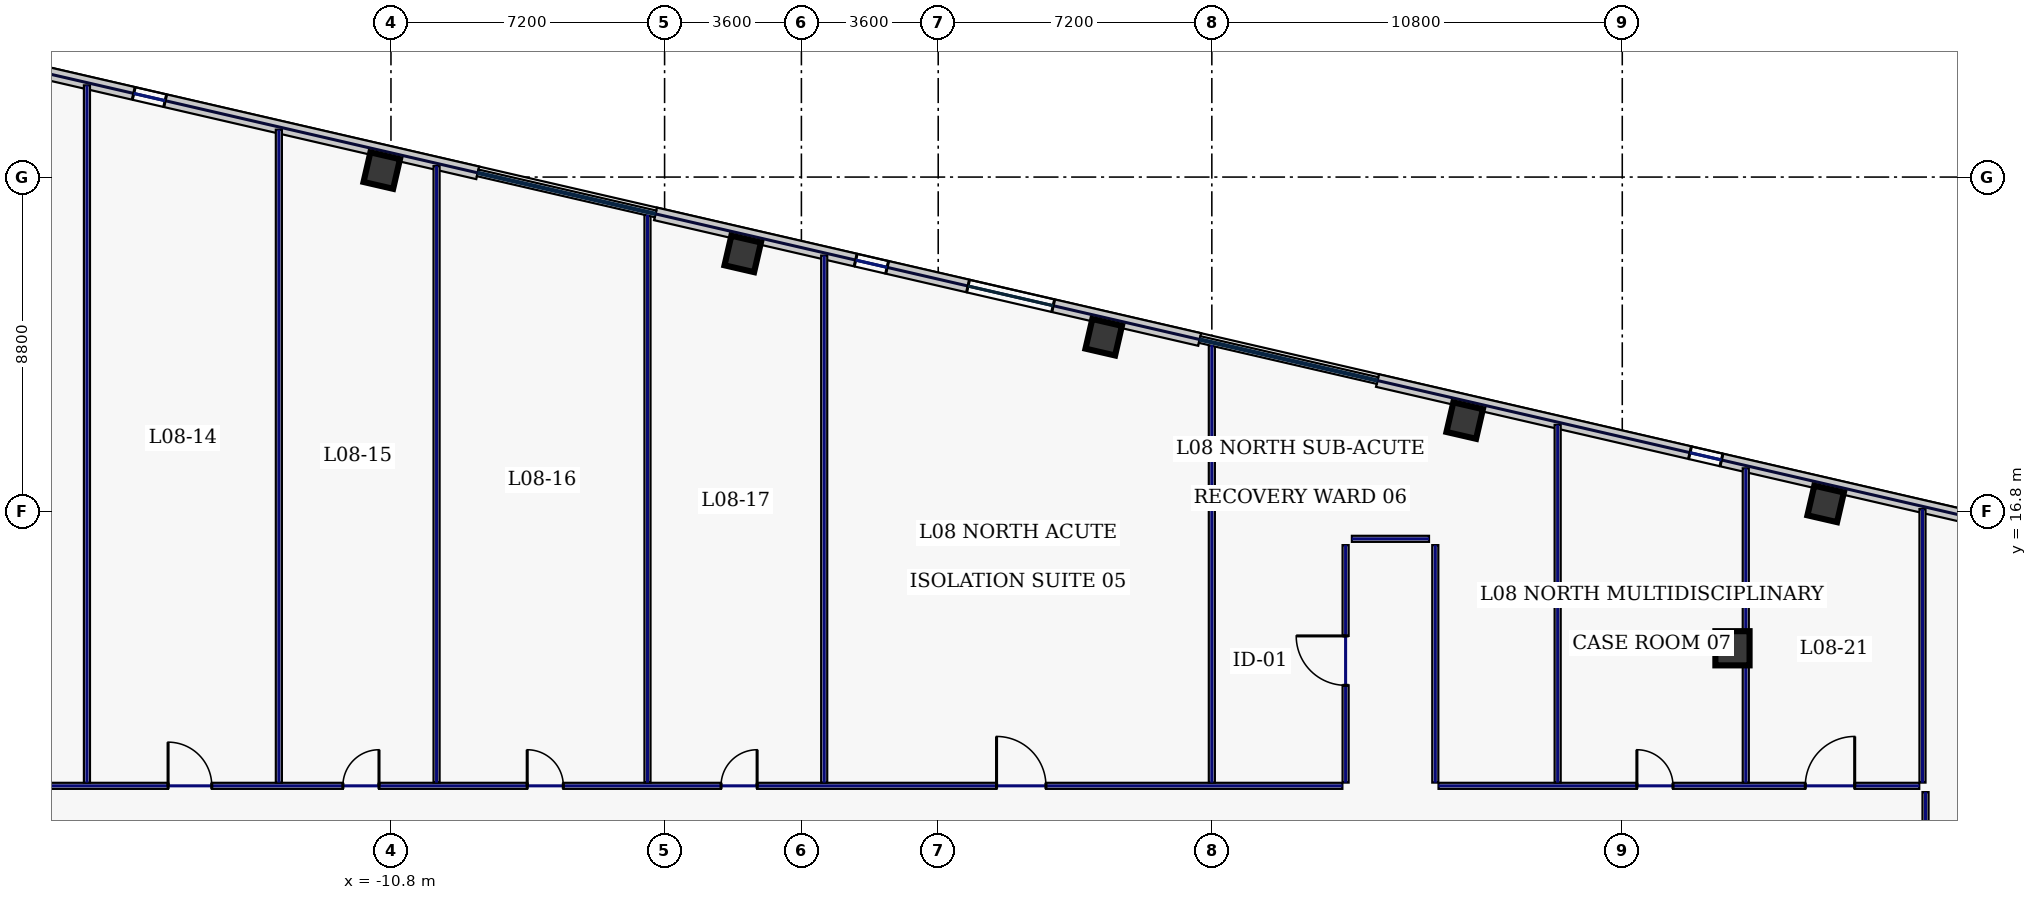
"""IFC4 building model, lengths in metres.
Left out: names, types, materials, properties, quantities, classifications, styles, units other than length and angle.
Written with IfcOpenShell. Run it as: python <this file> out.ifc"""

import sys

from ifc_helpers import new_model, si_unit, direction, frame, frame_2d, origin, origin_2d, place, context, subcontext, project, spatial, rectangle, hollow_rectangle, extrude, element, fill, save


model = new_model("IFC4")
c1 = context("Model", 3, precision=1e-05, world=origin(), true_north=direction((0.0, 1.0)))
c2 = subcontext(c1, "Body", "Model", "MODEL_VIEW")
j1 = project(units=[si_unit("LENGTHUNIT", "METRE"), si_unit("PLANEANGLEUNIT", "RADIAN")], contexts=[c1])
p1 = place(None, origin())
s1 = spatial("IfcSite", under=j1, at=p1, CompositionType="ELEMENT")
p2 = place(p1, origin())
s2 = spatial("IfcBuilding", under=s1, at=p2, CompositionType="ELEMENT")
p3 = place(p2, frame((0.0, 0.0, 43.4)))
s3 = spatial("IfcBuildingStorey", under=s2, at=p3, CompositionType="ELEMENT", Elevation=43.4)
p4 = place(p3, frame((24.5, 13.2, 0.0), z_axis=(0.0, 0.0, 1.0), x_axis=(1.0, 0.0, 0.0)))
e1 = element("IfcColumn", 1, at=p4, inside=s3, PredefinedType="COLUMN", context=c2, shape_type="SweptSolid", body=[
    extrude(hollow_rectangle(XDim=0.9, YDim=0.9, WallThickness=0.04, at=origin_2d()), origin(), (0.0, 0.0, 1.0), 3.74),
])
for number, where, z_axis, x_axis in (
    (2, (26.952, 16.999, 0.0), (0.0, 0.0, 1.0), (0.974, -0.225, 0.0)),
    (3, (17.454, 19.192, 0.0), (0.0, 0.0, 1.0), (0.974, -0.225, 0.0)),
    (4, (7.955, 21.385, 0.0), (0.0, 0.0, 1.0), (0.974, -0.225, 0.0)),
    (5, (-1.544, 23.578, 0.0), (0.0, 0.0, 1.0), (0.974, -0.225, 0.0)),
    (6, (-11.042, 25.771, 0.0), (0.0, 0.0, 1.0), (0.974, -0.225, 0.0)),
):
    element("IfcColumn", number, at=place(p3, frame(where, z_axis=z_axis, x_axis=x_axis)), inside=s3, PredefinedType="COLUMN", context=c2, shape_type="SweptSolid", body=[
        extrude(hollow_rectangle(XDim=0.8, YDim=0.8, WallThickness=0.036, at=origin_2d()), origin(), (0.0, 0.0, 1.0), 3.74),
    ])
p5 = place(p3, frame((37.229, 15.15, 0.0), z_axis=(0.0, 0.0, 1.0), x_axis=(-0.97436993772, 0.224951604723, 0.0)))
e7 = element("IfcWall", 7, at=p5, inside=s3, PredefinedType="STANDARD", context=c2, shape_type="SweptSolid", body=[
    extrude(rectangle(XDim=22.651, YDim=0.34, at=frame_2d((11.326, 0.0))), origin(), (0.0, 0.0, 1.0), 3.74),
])
p6 = place(p5, frame((13.361, 0.0, 0.77)))
e8 = element("IfcOpeningElement", 8, at=p6, cuts=e7, PredefinedType="OPENING", context=c2, shape_type="SweptSolid", body=[
    extrude(rectangle(XDim=0.85, YDim=1.85, at=frame_2d((0.425, 0.925))), frame((0.0, 0.18, 0.0), z_axis=(0.0, -1.0, 0.0), x_axis=(1.0, 0.0, 0.0)), (0.0, 0.0, 1.0), 0.36),
])
p7 = place(p5, frame((2.162, 0.0, 0.77)))
e9 = element("IfcOpeningElement", 9, at=p7, cuts=e7, PredefinedType="OPENING", context=c2, shape_type="SweptSolid", body=[
    extrude(rectangle(XDim=2.3, YDim=2.1, at=frame_2d((1.15, 1.05))), frame((0.0, 0.18, 0.0), z_axis=(0.0, -1.0, 0.0), x_axis=(1.0, 0.0, 0.0)), (0.0, 0.0, 1.0), 0.36),
])
p8 = place(p3, frame((10.481, 21.325, 0.0), z_axis=(0.0, 0.0, 1.0), x_axis=(-0.974369353393, 0.2249541357, 0.0)))
e10 = element("IfcWall", 10, at=p8, inside=s3, PredefinedType="STANDARD", context=c2, shape_type="SweptSolid", body=[
    extrude(rectangle(XDim=14.697, YDim=0.34, at=frame_2d((7.349, 0.0))), origin(), (0.0, 0.0, 1.0), 3.74),
])
p9 = place(p8, frame((8.441, 0.0, 0.77)))
e11 = element("IfcOpeningElement", 11, at=p9, cuts=e10, PredefinedType="OPENING", context=c2, shape_type="SweptSolid", body=[
    extrude(rectangle(XDim=0.85, YDim=1.85, at=frame_2d((0.425, 0.925))), frame((0.0, 0.18, 0.0), z_axis=(0.0, -1.0, 0.0), x_axis=(1.0, 0.0, 0.0)), (0.0, 0.0, 1.0), 0.36),
])
p10 = place(p8, frame((3.956, 0.0, 0.77)))
e12 = element("IfcOpeningElement", 12, at=p10, cuts=e10, PredefinedType="OPENING", context=c2, shape_type="SweptSolid", body=[
    extrude(rectangle(XDim=2.3, YDim=2.1, at=frame_2d((1.15, 1.05))), frame((0.0, 0.18, 0.0), z_axis=(0.0, -1.0, 0.0), x_axis=(1.0, 0.0, 0.0)), (0.0, 0.0, 1.0), 0.36),
])
p11 = place(p3, frame((-8.517, 25.711, 0.0), z_axis=(0.0, 0.0, 1.0), x_axis=(-0.974372845456, 0.224939009598, 0.0)))
e13 = element("IfcWall", 13, at=p11, inside=s3, PredefinedType="STANDARD", context=c2, shape_type="SweptSolid", body=[
    extrude(rectangle(XDim=22.652, YDim=0.34, at=frame_2d((11.326, 0.0))), origin(), (0.0, 0.0, 1.0), 3.74),
])
p12 = place(p11, frame((18.189, 0.0, 0.77)))
e14 = element("IfcOpeningElement", 14, at=p12, cuts=e13, PredefinedType="OPENING", context=c2, shape_type="SweptSolid", body=[
    extrude(rectangle(XDim=2.3, YDim=2.1, at=frame_2d((1.15, 1.05))), frame((0.0, 0.18, 0.0), z_axis=(0.0, -1.0, 0.0), x_axis=(1.0, 0.0, 0.0)), (0.0, 0.0, 1.0), 0.36),
])
p13 = place(p11, frame((13.705, 0.0, 0.77)))
e15 = element("IfcOpeningElement", 15, at=p13, cuts=e13, PredefinedType="OPENING", context=c2, shape_type="SweptSolid", body=[
    extrude(rectangle(XDim=2.3, YDim=2.1, at=frame_2d((1.15, 1.05))), frame((0.0, 0.18, 0.0), z_axis=(0.0, -1.0, 0.0), x_axis=(1.0, 0.0, 0.0)), (0.0, 0.0, 1.0), 0.36),
])
p14 = place(p11, frame((8.441, 0.0, 0.77)))
e16 = element("IfcOpeningElement", 16, at=p14, cuts=e13, PredefinedType="OPENING", context=c2, shape_type="SweptSolid", body=[
    extrude(rectangle(XDim=0.85, YDim=1.85, at=frame_2d((0.425, 0.925))), frame((0.0, 0.18, 0.0), z_axis=(0.0, -1.0, 0.0), x_axis=(1.0, 0.0, 0.0)), (0.0, 0.0, 1.0), 0.36),
])
p15 = place(p3, frame((-29.415, 9.58, 0.0), z_axis=(0.0, 0.0, 1.0), x_axis=(1.0, 0.0, 0.0)))
e17 = element("IfcWall", 17, at=p15, inside=s3, PredefinedType="PARTITIONING", context=c2, shape_type="SweptSolid", body=[
    extrude(rectangle(XDim=43.65, YDim=0.16, at=frame_2d((21.825, 0.0))), origin(), (0.0, 0.0, 1.0), 3.74),
])
p16 = place(p15, frame((2.044, 0.0, 0.0)))
e18 = element("IfcOpeningElement", 18, at=p16, cuts=e17, PredefinedType="OPENING", context=c2, shape_type="SweptSolid", body=[
    extrude(rectangle(XDim=0.95, YDim=2.2, at=frame_2d((0.475, 1.1))), frame((0.0, 0.09, 0.0), z_axis=(0.0, -1.0, 0.0), x_axis=(1.0, 0.0, 0.0)), (0.0, 0.0, 1.0), 0.18),
])
p17 = place(p15, frame((7.025, 0.0, 0.0)))
e19 = element("IfcOpeningElement", 19, at=p17, cuts=e17, PredefinedType="OPENING", context=c2, shape_type="SweptSolid", body=[
    extrude(rectangle(XDim=1.3, YDim=2.2, at=frame_2d((0.65, 1.1))), frame((0.0, 0.09, 0.0), z_axis=(0.0, -1.0, 0.0), x_axis=(1.0, 0.0, 0.0)), (0.0, 0.0, 1.0), 0.18),
])
p18 = place(p15, frame((12.75, 0.0, 0.0)))
e20 = element("IfcOpeningElement", 20, at=p18, cuts=e17, PredefinedType="OPENING", context=c2, shape_type="SweptSolid", body=[
    extrude(rectangle(XDim=1.15, YDim=2.2, at=frame_2d((0.575, 1.1))), frame((0.0, 0.09, 0.0), z_axis=(0.0, -1.0, 0.0), x_axis=(1.0, 0.0, 0.0)), (0.0, 0.0, 1.0), 0.18),
])
p19 = place(p15, frame((17.35, 0.0, 0.0)))
e21 = element("IfcOpeningElement", 21, at=p19, cuts=e17, PredefinedType="OPENING", context=c2, shape_type="SweptSolid", body=[
    extrude(rectangle(XDim=0.95, YDim=2.2, at=frame_2d((0.475, 1.1))), frame((0.0, 0.09, 0.0), z_axis=(0.0, -1.0, 0.0), x_axis=(1.0, 0.0, 0.0)), (0.0, 0.0, 1.0), 0.18),
])
p20 = place(p15, frame((22.2, 0.0, 0.0)))
e22 = element("IfcOpeningElement", 22, at=p20, cuts=e17, PredefinedType="OPENING", context=c2, shape_type="SweptSolid", body=[
    extrude(rectangle(XDim=0.95, YDim=2.2, at=frame_2d((0.475, 1.1))), frame((0.0, 0.09, 0.0), z_axis=(0.0, -1.0, 0.0), x_axis=(1.0, 0.0, 0.0)), (0.0, 0.0, 1.0), 0.18),
])
p21 = place(p15, frame((27.3, 0.0, 0.0)))
e23 = element("IfcOpeningElement", 23, at=p21, cuts=e17, PredefinedType="OPENING", context=c2, shape_type="SweptSolid", body=[
    extrude(rectangle(XDim=0.95, YDim=2.2, at=frame_2d((0.475, 1.1))), frame((0.0, 0.09, 0.0), z_axis=(0.0, -1.0, 0.0), x_axis=(1.0, 0.0, 0.0)), (0.0, 0.0, 1.0), 0.18),
])
p22 = place(p15, frame((34.55, 0.0, 0.0)))
e24 = element("IfcOpeningElement", 24, at=p22, cuts=e17, PredefinedType="OPENING", context=c2, shape_type="SweptSolid", body=[
    extrude(rectangle(XDim=1.3, YDim=2.2, at=frame_2d((0.65, 1.1))), frame((0.0, 0.09, 0.0), z_axis=(0.0, -1.0, 0.0), x_axis=(1.0, 0.0, 0.0)), (0.0, 0.0, 1.0), 0.18),
])
p23 = place(p3, frame((14.32, 9.665, 0.0), z_axis=(0.0, 0.0, 1.0), x_axis=(0.0, 1.0, 0.0)))
e25 = element("IfcWall", 25, at=p23, inside=s3, PredefinedType="PARTITIONING", context=c2, shape_type="SweptSolid", body=[
    extrude(rectangle(XDim=6.25, YDim=0.16, at=frame_2d((3.125, 0.0))), origin(), (0.0, 0.0, 1.0), 3.74),
])
p24 = place(p23, frame((2.56, 0.0, 0.0)))
e26 = element("IfcOpeningElement", 26, at=p24, cuts=e25, PredefinedType="OPENING", context=c2, shape_type="SweptSolid", body=[
    extrude(rectangle(XDim=1.3, YDim=2.2, at=frame_2d((0.65, 1.1))), frame((0.0, 0.09, 0.0), z_axis=(0.0, -1.0, 0.0), x_axis=(1.0, 0.0, 0.0)), (0.0, 0.0, 1.0), 0.18),
])
p25 = place(p3, frame((14.485, 16.08, 0.0), z_axis=(0.0, 0.0, 1.0), x_axis=(1.0, 0.0, 0.0)))
e27 = element("IfcWall", 27, at=p25, inside=s3, PredefinedType="PARTITIONING", context=c2, shape_type="SweptSolid", body=[
    extrude(rectangle(XDim=2.03, YDim=0.16, at=frame_2d((1.015, 0.0))), origin(), (0.0, 0.0, 1.0), 3.74),
])
p26 = place(p3, frame((16.68, 15.915, 0.0), z_axis=(0.0, 0.0, 1.0), x_axis=(0.0, -1.0, 0.0)))
e28 = element("IfcWall", 28, at=p26, inside=s3, PredefinedType="PARTITIONING", context=c2, shape_type="SweptSolid", body=[
    extrude(rectangle(XDim=6.25, YDim=0.16, at=frame_2d((3.125, 0.0))), origin(), (0.0, 0.0, 1.0), 3.74),
])
p27 = place(p3, frame((16.765, 9.58, 0.0), z_axis=(0.0, 0.0, 1.0), x_axis=(1.0, 0.0, 0.0)))
e29 = element("IfcWall", 29, at=p27, inside=s3, PredefinedType="PARTITIONING", context=c2, shape_type="SweptSolid", body=[
    extrude(rectangle(XDim=12.65, YDim=0.16, at=frame_2d((6.325, 0.0))), origin(), (0.0, 0.0, 1.0), 3.74),
])
p28 = place(p27, frame((5.22, 0.0, 0.0)))
e30 = element("IfcOpeningElement", 30, at=p28, cuts=e29, PredefinedType="OPENING", context=c2, shape_type="SweptSolid", body=[
    extrude(rectangle(XDim=0.95, YDim=2.2, at=frame_2d((0.475, 1.1))), frame((0.0, 0.09, 0.0), z_axis=(0.0, -1.0, 0.0), x_axis=(1.0, 0.0, 0.0)), (0.0, 0.0, 1.0), 0.18),
])
p29 = place(p27, frame((9.651, 0.0, 0.0)))
e31 = element("IfcOpeningElement", 31, at=p29, cuts=e29, PredefinedType="OPENING", context=c2, shape_type="SweptSolid", body=[
    extrude(rectangle(XDim=1.3, YDim=2.2, at=frame_2d((0.65, 1.1))), frame((0.0, 0.09, 0.0), z_axis=(0.0, -1.0, 0.0), x_axis=(1.0, 0.0, 0.0)), (0.0, 0.0, 1.0), 0.18),
])
p30 = place(p3, frame((29.58, 9.415, 0.0), z_axis=(0.0, 0.0, 1.0), x_axis=(0.0, -1.0, 0.0)))
e32 = element("IfcWall", 32, at=p30, inside=s3, PredefinedType="PARTITIONING", context=c2, shape_type="SweptSolid", body=[
    extrude(rectangle(XDim=18.63, YDim=0.16, at=frame_2d((9.315, 0.0))), origin(), (0.0, 0.0, 1.0), 3.74),
])
p31 = place(p30, frame((16.081, 0.0, 0.0)))
e33 = element("IfcOpeningElement", 33, at=p31, cuts=e32, PredefinedType="OPENING", context=c2, shape_type="SweptSolid", body=[
    extrude(rectangle(XDim=0.95, YDim=2.2, at=frame_2d((0.475, 1.1))), frame((0.0, 0.09, 0.0), z_axis=(0.0, -1.0, 0.0), x_axis=(1.0, 0.0, 0.0)), (0.0, 0.0, 1.0), 0.18),
])
p32 = place(p30, frame((11.0, 0.0, 0.0)))
e34 = element("IfcOpeningElement", 34, at=p32, cuts=e32, PredefinedType="OPENING", context=c2, shape_type="SweptSolid", body=[
    extrude(rectangle(XDim=0.95, YDim=2.2, at=frame_2d((0.475, 1.1))), frame((0.0, 0.09, 0.0), z_axis=(0.0, -1.0, 0.0), x_axis=(1.0, 0.0, 0.0)), (0.0, 0.0, 1.0), 0.18),
])
p33 = place(p30, frame((5.8, 0.0, 0.0)))
e35 = element("IfcOpeningElement", 35, at=p33, cuts=e32, PredefinedType="OPENING", context=c2, shape_type="SweptSolid", body=[
    extrude(rectangle(XDim=0.95, YDim=2.2, at=frame_2d((0.475, 1.1))), frame((0.0, 0.09, 0.0), z_axis=(0.0, -1.0, 0.0), x_axis=(1.0, 0.0, 0.0)), (0.0, 0.0, 1.0), 0.18),
])
p34 = place(p30, frame((1.869, 0.0, 0.0)))
e36 = element("IfcOpeningElement", 36, at=p34, cuts=e32, PredefinedType="OPENING", context=c2, shape_type="SweptSolid", body=[
    extrude(rectangle(XDim=0.95, YDim=2.2, at=frame_2d((0.475, 1.1))), frame((0.0, 0.09, 0.0), z_axis=(0.0, -1.0, 0.0), x_axis=(1.0, 0.0, 0.0)), (0.0, 0.0, 1.0), 0.18),
])
p35 = place(p3, frame((29.5, 9.665, 0.0), z_axis=(0.0, 0.0, 1.0), x_axis=(0.0, 1.0, 0.0)))
e37 = element("IfcWall", 37, at=p35, inside=s3, PredefinedType="PARTITIONING", context=c2, shape_type="SweptSolid", body=[
    extrude(rectangle(XDim=7.197, YDim=0.16, at=frame_2d((3.599, 0.0))), origin(), (0.0, 0.0, 1.0), 3.74),
])
p36 = place(p3, frame((-18.8, 9.665, 0.0), z_axis=(0.0, 0.0, 1.0), x_axis=(0.0, 1.0, 0.0)))
e38 = element("IfcWall", 38, at=p36, inside=s3, PredefinedType="PARTITIONING", context=c2, shape_type="SweptSolid", body=[
    extrude(rectangle(XDim=18.348, YDim=0.16, at=frame_2d((9.174, 0.0))), origin(), (0.0, 0.0, 1.0), 3.74),
])
p37 = place(p3, frame((-9.6, 9.665, 0.0), z_axis=(0.0, 0.0, 1.0), x_axis=(0.0, 1.0, 0.0)))
e39 = element("IfcWall", 39, at=p37, inside=s3, PredefinedType="PARTITIONING", context=c2, shape_type="SweptSolid", body=[
    extrude(rectangle(XDim=16.224, YDim=0.16, at=frame_2d((8.112, 0.0))), origin(), (0.0, 0.0, 1.0), 3.74),
])
p38 = place(p3, frame((0.6, 9.665, 0.0), z_axis=(0.0, 0.0, 1.0), x_axis=(0.0, 1.0, 0.0)))
e40 = element("IfcWall", 40, at=p38, inside=s3, PredefinedType="PARTITIONING", context=c2, shape_type="SweptSolid", body=[
    extrude(rectangle(XDim=13.869, YDim=0.16, at=frame_2d((6.935, 0.0))), origin(), (0.0, 0.0, 1.0), 3.74),
])
p39 = place(p3, frame((10.8, 9.665, 0.0), z_axis=(0.0, 0.0, 1.0), x_axis=(0.0, 1.0, 0.0)))
e41 = element("IfcWall", 41, at=p39, inside=s3, PredefinedType="PARTITIONING", context=c2, shape_type="SweptSolid", body=[
    extrude(rectangle(XDim=11.515, YDim=0.16, at=frame_2d((5.757, 0.0))), origin(), (0.0, 0.0, 1.0), 3.74),
])
p40 = place(p3, frame((19.9, 9.665, 0.0), z_axis=(0.0, 0.0, 1.0), x_axis=(0.0, 1.0, 0.0)))
e42 = element("IfcWall", 42, at=p40, inside=s3, PredefinedType="PARTITIONING", context=c2, shape_type="SweptSolid", body=[
    extrude(rectangle(XDim=9.414, YDim=0.16, at=frame_2d((4.707, 0.0))), origin(), (0.0, 0.0, 1.0), 3.74),
])
p41 = place(p3, frame((24.85, 9.665, 0.0), z_axis=(0.0, 0.0, 1.0), x_axis=(0.0, 1.0, 0.0)))
e43 = element("IfcWall", 43, at=p41, inside=s3, PredefinedType="PARTITIONING", context=c2, shape_type="SweptSolid", body=[
    extrude(rectangle(XDim=8.271, YDim=0.16, at=frame_2d((4.135, 0.0))), origin(), (0.0, 0.0, 1.0), 3.74),
])
p42 = place(p3, frame((-13.75, 9.665, 0.0), z_axis=(0.0, 0.0, 1.0), x_axis=(0.0, 1.0, 0.0)))
e44 = element("IfcWall", 44, at=p42, inside=s3, PredefinedType="PARTITIONING", context=c2, shape_type="SweptSolid", body=[
    extrude(rectangle(XDim=17.182, YDim=0.16, at=frame_2d((8.591, 0.0))), origin(), (0.0, 0.0, 1.0), 3.74),
])
p43 = place(p3, frame((-4.05, 9.665, 0.0), z_axis=(0.0, 0.0, 1.0), x_axis=(0.0, 1.0, 0.0)))
e45 = element("IfcWall", 45, at=p43, inside=s3, PredefinedType="PARTITIONING", context=c2, shape_type="SweptSolid", body=[
    extrude(rectangle(XDim=14.943, YDim=0.16, at=frame_2d((7.471, 0.0))), origin(), (0.0, 0.0, 1.0), 3.74),
])
p44 = place(p6, origin())
e46 = element("IfcWindow", 46, at=p44, inside=s3, PartitioningType="SINGLE_PANEL", PredefinedType="WINDOW", context=c2, shape_type="SweptSolid", body=[
    extrude(rectangle(XDim=0.85, YDim=1.85, at=frame_2d((0.425, 0.925))), frame((0.0, 0.03, 0.0), z_axis=(0.0, -1.0, 0.0), x_axis=(1.0, 0.0, 0.0)), (0.0, 0.0, 1.0), 0.06),
])
fill(e8, e46)
p45 = place(p9, origin())
e47 = element("IfcWindow", 47, at=p45, inside=s3, PartitioningType="SINGLE_PANEL", PredefinedType="WINDOW", context=c2, shape_type="SweptSolid", body=[
    extrude(rectangle(XDim=0.85, YDim=1.85, at=frame_2d((0.425, 0.925))), frame((0.0, 0.03, 0.0), z_axis=(0.0, -1.0, 0.0), x_axis=(1.0, 0.0, 0.0)), (0.0, 0.0, 1.0), 0.06),
])
fill(e11, e47)
p46 = place(p10, origin())
e48 = element("IfcWindow", 48, at=p46, inside=s3, PartitioningType="SINGLE_PANEL", PredefinedType="WINDOW", context=c2, shape_type="SweptSolid", body=[
    extrude(rectangle(XDim=2.3, YDim=2.1, at=frame_2d((1.15, 1.05))), frame((0.0, 0.03, 0.0), z_axis=(0.0, -1.0, 0.0), x_axis=(1.0, 0.0, 0.0)), (0.0, 0.0, 1.0), 0.06),
])
fill(e12, e48)
p47 = place(p14, origin())
e49 = element("IfcWindow", 49, at=p47, inside=s3, PartitioningType="SINGLE_PANEL", PredefinedType="WINDOW", context=c2, shape_type="SweptSolid", body=[
    extrude(rectangle(XDim=0.85, YDim=1.85, at=frame_2d((0.425, 0.925))), frame((0.0, 0.03, 0.0), z_axis=(0.0, -1.0, 0.0), x_axis=(1.0, 0.0, 0.0)), (0.0, 0.0, 1.0), 0.06),
])
fill(e16, e49)
p48 = place(p18, origin())
e50 = element("IfcDoor", 50, at=p48, inside=s3, OperationType="SINGLE_SWING_LEFT", PredefinedType="DOOR", context=c2, shape_type="SweptSolid", body=[
    extrude(rectangle(XDim=1.15, YDim=2.2, at=frame_2d((0.575, 1.1))), frame((0.0, 0.025, 0.0), z_axis=(0.0, -1.0, 0.0), x_axis=(1.0, 0.0, 0.0)), (0.0, 0.0, 1.0), 0.05),
])
fill(e20, e50)
p49 = place(p19, origin())
e51 = element("IfcDoor", 51, at=p49, inside=s3, OperationType="SINGLE_SWING_RIGHT", PredefinedType="DOOR", context=c2, shape_type="SweptSolid", body=[
    extrude(rectangle(XDim=0.95, YDim=2.2, at=frame_2d((0.475, 1.1))), frame((0.0, 0.025, 0.0), z_axis=(0.0, -1.0, 0.0), x_axis=(1.0, 0.0, 0.0)), (0.0, 0.0, 1.0), 0.05),
])
fill(e21, e51)
p50 = place(p20, origin())
e52 = element("IfcDoor", 52, at=p50, inside=s3, OperationType="SINGLE_SWING_LEFT", PredefinedType="DOOR", context=c2, shape_type="SweptSolid", body=[
    extrude(rectangle(XDim=0.95, YDim=2.2, at=frame_2d((0.475, 1.1))), frame((0.0, 0.025, 0.0), z_axis=(0.0, -1.0, 0.0), x_axis=(1.0, 0.0, 0.0)), (0.0, 0.0, 1.0), 0.05),
])
fill(e22, e52)
p51 = place(p21, origin())
e53 = element("IfcDoor", 53, at=p51, inside=s3, OperationType="SINGLE_SWING_RIGHT", PredefinedType="DOOR", context=c2, shape_type="SweptSolid", body=[
    extrude(rectangle(XDim=0.95, YDim=2.2, at=frame_2d((0.475, 1.1))), frame((0.0, 0.025, 0.0), z_axis=(0.0, -1.0, 0.0), x_axis=(1.0, 0.0, 0.0)), (0.0, 0.0, 1.0), 0.05),
])
fill(e23, e53)
p52 = place(p22, origin())
e54 = element("IfcDoor", 54, at=p52, inside=s3, OperationType="SINGLE_SWING_LEFT", PredefinedType="DOOR", context=c2, shape_type="SweptSolid", body=[
    extrude(rectangle(XDim=1.3, YDim=2.2, at=frame_2d((0.65, 1.1))), frame((0.0, 0.025, 0.0), z_axis=(0.0, -1.0, 0.0), x_axis=(1.0, 0.0, 0.0)), (0.0, 0.0, 1.0), 0.05),
])
fill(e24, e54)
p53 = place(p24, origin())
e55 = element("IfcDoor", 55, at=p53, inside=s3, OperationType="SINGLE_SWING_RIGHT", PredefinedType="DOOR", context=c2, shape_type="SweptSolid", body=[
    extrude(rectangle(XDim=1.3, YDim=2.2, at=frame_2d((0.65, 1.1))), frame((0.0, 0.025, 0.0), z_axis=(0.0, -1.0, 0.0), x_axis=(1.0, 0.0, 0.0)), (0.0, 0.0, 1.0), 0.05),
])
fill(e26, e55)
p54 = place(p28, origin())
e56 = element("IfcDoor", 56, at=p54, inside=s3, OperationType="SINGLE_SWING_LEFT", PredefinedType="DOOR", context=c2, shape_type="SweptSolid", body=[
    extrude(rectangle(XDim=0.95, YDim=2.2, at=frame_2d((0.475, 1.1))), frame((0.0, 0.025, 0.0), z_axis=(0.0, -1.0, 0.0), x_axis=(1.0, 0.0, 0.0)), (0.0, 0.0, 1.0), 0.05),
])
fill(e30, e56)
p55 = place(p29, origin())
e57 = element("IfcDoor", 57, at=p55, inside=s3, OperationType="SINGLE_SWING_RIGHT", PredefinedType="DOOR", context=c2, shape_type="SweptSolid", body=[
    extrude(rectangle(XDim=1.3, YDim=2.2, at=frame_2d((0.65, 1.1))), frame((0.0, 0.025, 0.0), z_axis=(0.0, -1.0, 0.0), x_axis=(1.0, 0.0, 0.0)), (0.0, 0.0, 1.0), 0.05),
])
fill(e31, e57)
save(model, sys.argv[1])
